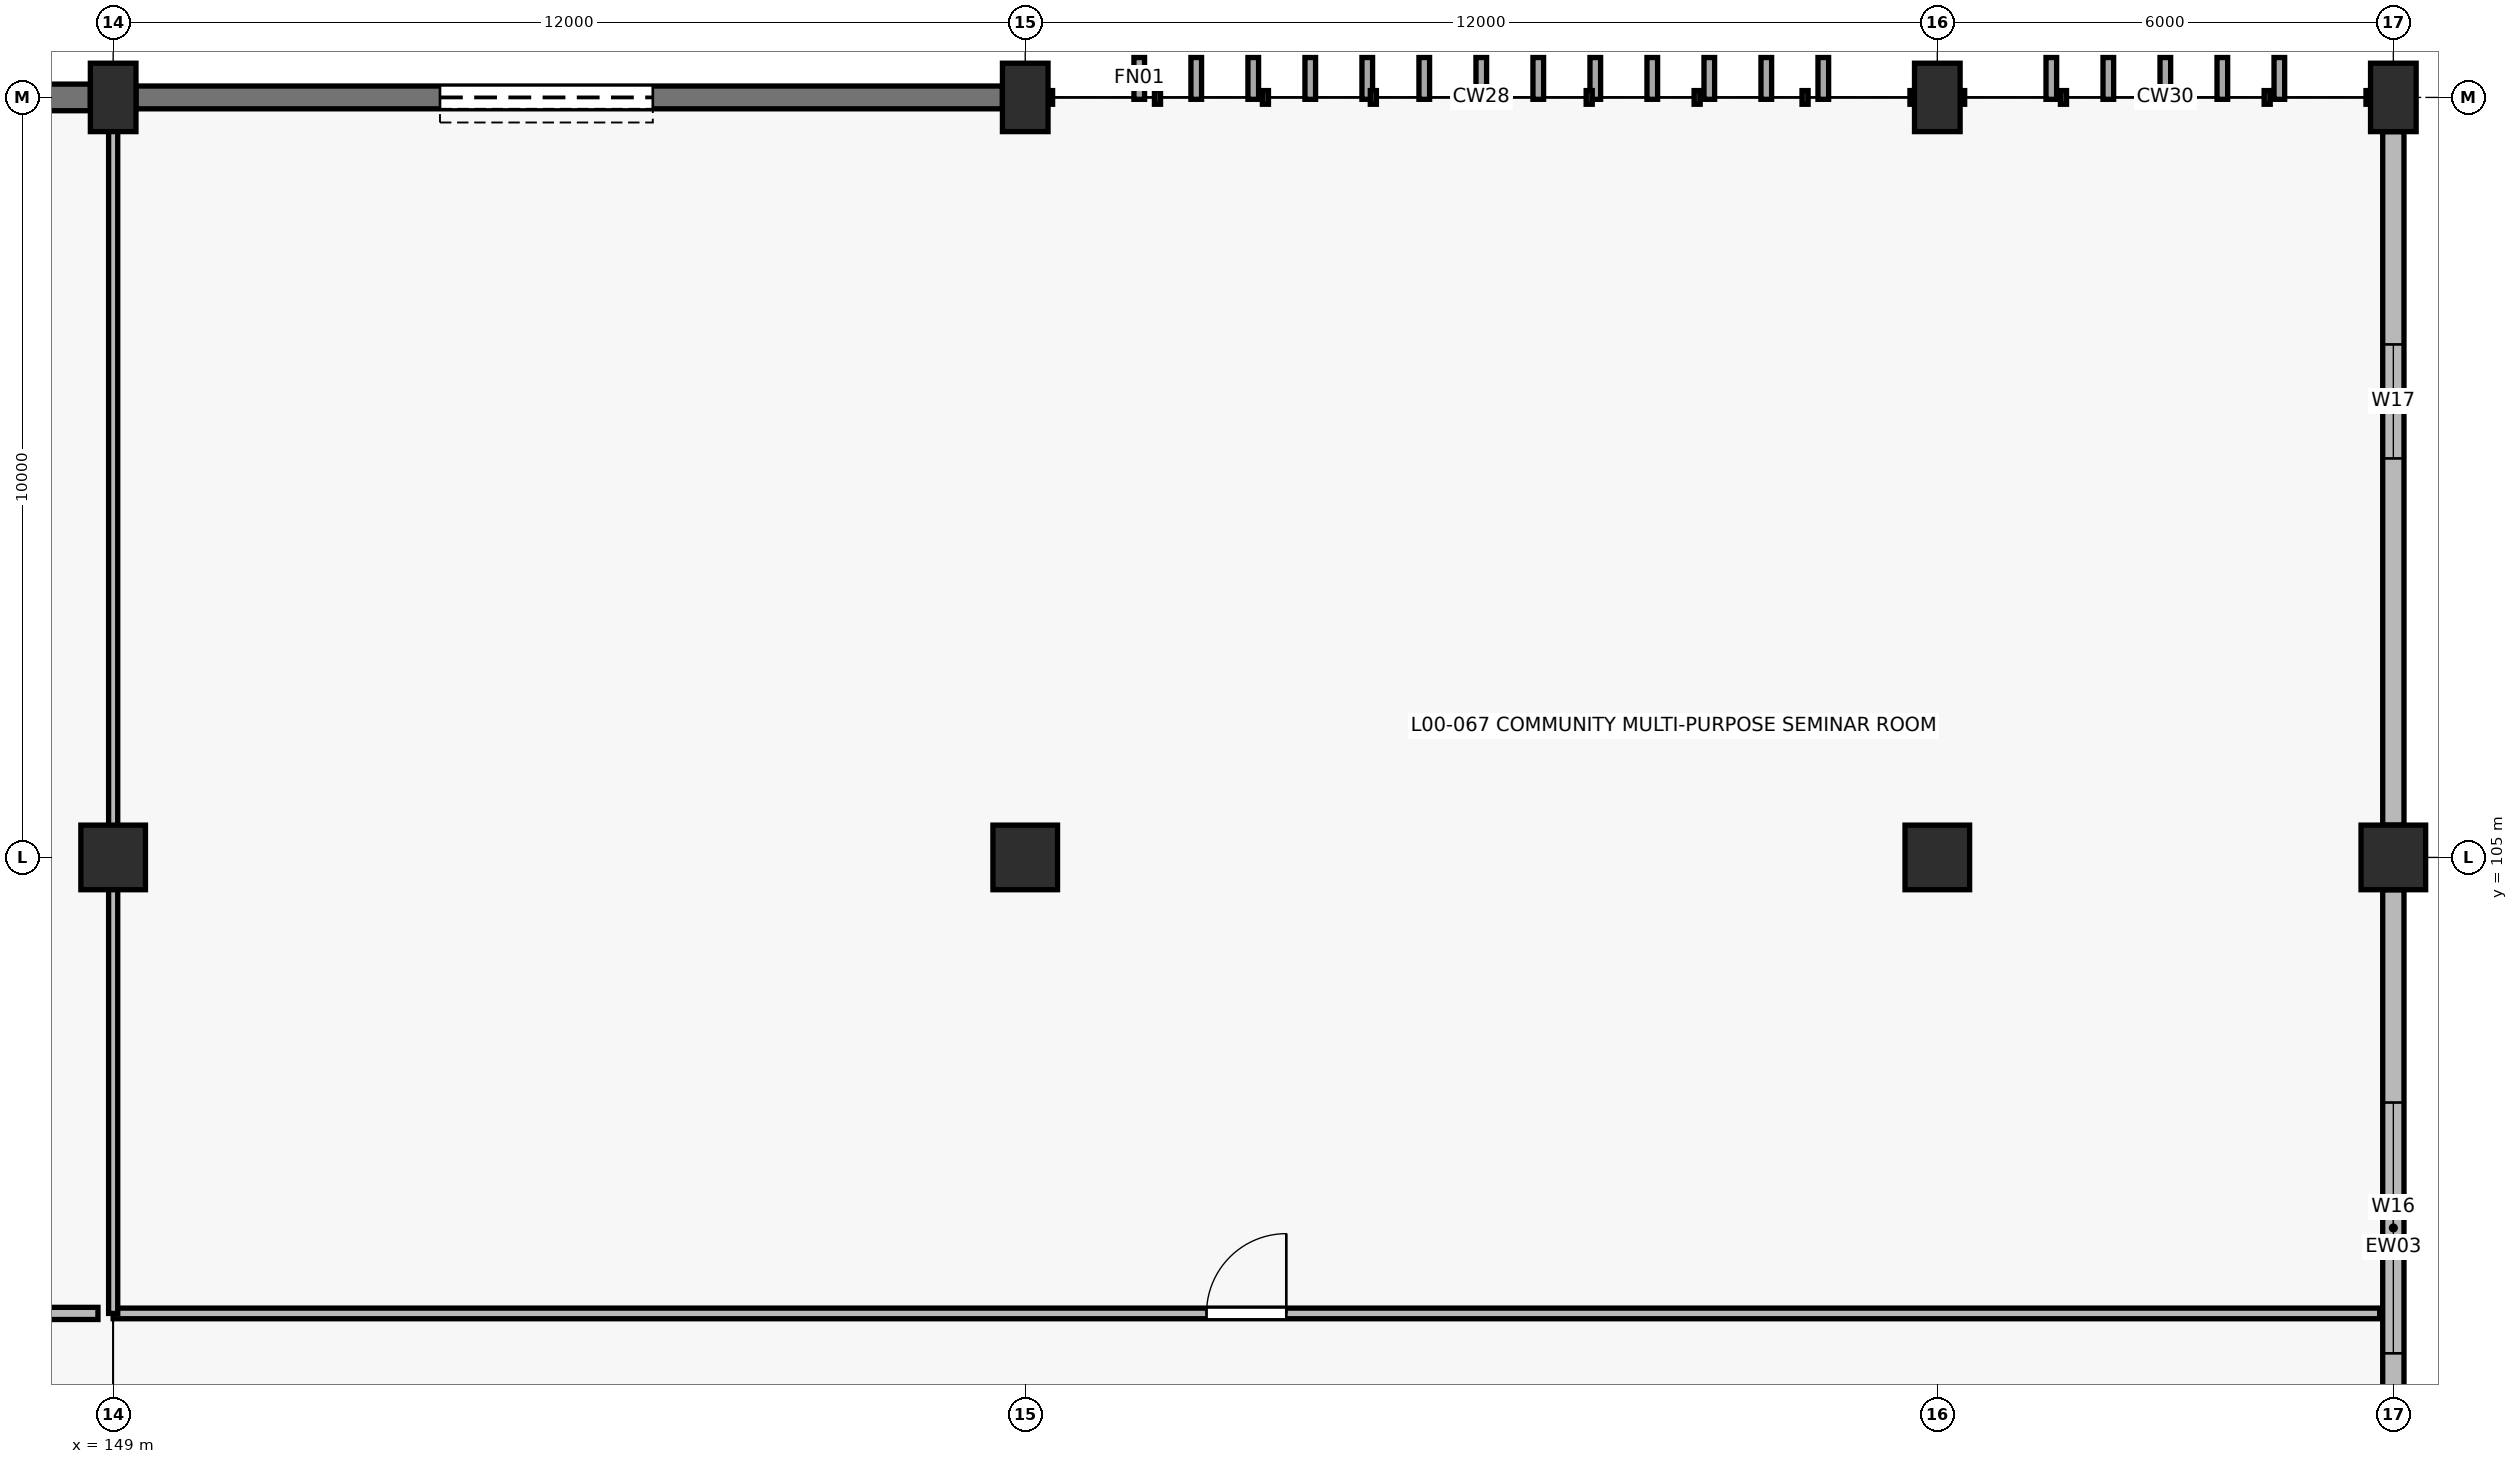
"""IFC4 building model, lengths in metres.
Left out: names, types, materials, properties, quantities, classifications, styles, units other than length and angle.
Written with IfcOpenShell. Run it as: python <this file> out.ifc"""

import sys

from ifc_helpers import new_model, si_unit, direction, frame, frame_2d, origin, origin_2d, place, context, subcontext, project, spatial, rectangle, extrude, element, fill, save


model = new_model("IFC4")
c1 = context("Model", 3, precision=1e-05, world=origin(), true_north=direction((0.0, 1.0)))
c2 = subcontext(c1, "Body", "Model", "MODEL_VIEW")
j1 = project(units=[si_unit("LENGTHUNIT", "METRE"), si_unit("PLANEANGLEUNIT", "RADIAN")], contexts=[c1])
p1 = place(None, origin())
s1 = spatial("IfcSite", under=j1, at=p1, CompositionType="ELEMENT")
p2 = place(p1, origin())
s2 = spatial("IfcBuilding", under=s1, at=p2, CompositionType="ELEMENT")
p3 = place(p2, origin())
s3 = spatial("IfcBuildingStorey", under=s2, at=p3, CompositionType="ELEMENT", Elevation=0.0)
p4 = place(p3, frame((149.0, 105.0, 0.0), z_axis=(0.0, 0.0, 1.0), x_axis=(1.0, 0.0, 0.0)))
e1 = element("IfcColumn", 1, at=p4, inside=s3, PredefinedType="COLUMN", context=c2, shape_type="SweptSolid", body=[
    extrude(rectangle(XDim=0.85, YDim=0.85, at=origin_2d()), origin(), (0.0, 0.0, 1.0), 4.8),
])
p5 = place(p3, frame((149.0, 115.0, 0.0), z_axis=(0.0, 0.0, 1.0), x_axis=(1.0, 0.0, 0.0)))
e2 = element("IfcColumn", 2, at=p5, inside=s3, PredefinedType="COLUMN", context=c2, shape_type="SweptSolid", body=[
    extrude(rectangle(XDim=0.6, YDim=0.9, at=origin_2d()), origin(), (0.0, 0.0, 1.0), 4.8),
])
p6 = place(p3, frame((161.0, 105.0, 0.0), z_axis=(0.0, 0.0, 1.0), x_axis=(1.0, 0.0, 0.0)))
e3 = element("IfcColumn", 3, at=p6, inside=s3, PredefinedType="COLUMN", context=c2, shape_type="SweptSolid", body=[
    extrude(rectangle(XDim=0.85, YDim=0.85, at=origin_2d()), origin(), (0.0, 0.0, 1.0), 4.8),
])
p7 = place(p3, frame((161.0, 115.0, 0.0), z_axis=(0.0, 0.0, 1.0), x_axis=(1.0, 0.0, 0.0)))
e4 = element("IfcColumn", 4, at=p7, inside=s3, PredefinedType="COLUMN", context=c2, shape_type="SweptSolid", body=[
    extrude(rectangle(XDim=0.6, YDim=0.9, at=origin_2d()), origin(), (0.0, 0.0, 1.0), 4.8),
])
p8 = place(p3, frame((173.0, 105.0, 0.0), z_axis=(0.0, 0.0, 1.0), x_axis=(1.0, 0.0, 0.0)))
e5 = element("IfcColumn", 5, at=p8, inside=s3, PredefinedType="COLUMN", context=c2, shape_type="SweptSolid", body=[
    extrude(rectangle(XDim=0.85, YDim=0.85, at=origin_2d()), origin(), (0.0, 0.0, 1.0), 4.8),
])
p9 = place(p3, frame((173.0, 115.0, 0.0), z_axis=(0.0, 0.0, 1.0), x_axis=(1.0, 0.0, 0.0)))
e6 = element("IfcColumn", 6, at=p9, inside=s3, PredefinedType="COLUMN", context=c2, shape_type="SweptSolid", body=[
    extrude(rectangle(XDim=0.6, YDim=0.9, at=origin_2d()), origin(), (0.0, 0.0, 1.0), 4.8),
])
p10 = place(p3, frame((179.0, 105.0, 0.0), z_axis=(0.0, 0.0, 1.0), x_axis=(1.0, 0.0, 0.0)))
e7 = element("IfcColumn", 7, at=p10, inside=s3, PredefinedType="COLUMN", context=c2, shape_type="SweptSolid", body=[
    extrude(rectangle(XDim=0.85, YDim=0.85, at=origin_2d()), origin(), (0.0, 0.0, 1.0), 4.8),
])
p11 = place(p3, frame((179.0, 115.0, 0.0), z_axis=(0.0, 0.0, 1.0), x_axis=(1.0, 0.0, 0.0)))
e8 = element("IfcColumn", 8, at=p11, inside=s3, PredefinedType="COLUMN", context=c2, shape_type="SweptSolid", body=[
    extrude(rectangle(XDim=0.6, YDim=0.9, at=origin_2d()), origin(), (0.0, 0.0, 1.0), 4.8),
])
p12 = place(p3, frame((137.3, 115.0, 0.0), z_axis=(0.0, 0.0, 1.0), x_axis=(1.0, 0.0, 0.0)))
e9 = element("IfcWall", 9, at=p12, inside=s3, PredefinedType="SOLIDWALL", context=c2, shape_type="SweptSolid", body=[
    extrude(rectangle(XDim=11.4, YDim=0.35, at=frame_2d((5.7, 0.0))), origin(), (0.0, 0.0, 1.0), 4.8),
])
p13 = place(p12, frame((2.0, 0.0, 0.0)))
e10 = element("IfcOpeningElement", 10, at=p13, cuts=e9, PredefinedType="OPENING", context=c2, shape_type="SweptSolid", body=[
    extrude(rectangle(XDim=2.0, YDim=2.3, at=frame_2d((1.0, 1.15))), frame((0.0, 0.185, 0.0), z_axis=(0.0, -1.0, 0.0), x_axis=(1.0, 0.0, 0.0)), (0.0, 0.0, 1.0), 0.37),
])
p14 = place(p3, frame((149.3, 115.0, 0.0), z_axis=(0.0, 0.0, 1.0), x_axis=(1.0, 0.0, 0.0)))
e11 = element("IfcWall", 11, at=p14, inside=s3, PredefinedType="SOLIDWALL", context=c2, shape_type="SweptSolid", body=[
    extrude(rectangle(XDim=11.4, YDim=0.3, at=frame_2d((5.7, 0.0))), origin(), (0.0, 0.0, 1.0), 4.8),
])
p15 = place(p14, frame((4.0, 0.0, 0.0)))
e12 = element("IfcOpeningElement", 12, at=p15, cuts=e11, PredefinedType="OPENING", context=c2, shape_type="SweptSolid", body=[
    extrude(rectangle(XDim=2.8, YDim=2.7, at=frame_2d((1.4, 1.35))), frame((0.0, 0.16, 0.0), z_axis=(0.0, -1.0, 0.0), x_axis=(1.0, 0.0, 0.0)), (0.0, 0.0, 1.0), 0.32),
])
p16 = place(p3, frame((179.0, 104.575, 0.0), z_axis=(0.0, 0.0, 1.0), x_axis=(0.0, -1.0, 0.0)))
e13 = element("IfcWall", 13, at=p16, inside=s3, PredefinedType="SOLIDWALL", context=c2, shape_type="SweptSolid", body=[
    extrude(rectangle(XDim=9.395, YDim=0.28, at=frame_2d((4.698, 0.0))), origin(), (0.0, 0.0, 1.0), 3.625),
])
p17 = place(p16, frame((2.8, 0.0, 0.9)))
e14 = element("IfcOpeningElement", 14, at=p17, cuts=e13, PredefinedType="OPENING", context=c2, shape_type="SweptSolid", body=[
    extrude(rectangle(XDim=3.3, YDim=1.8, at=frame_2d((1.65, 0.9))), frame((0.0, 0.15, 0.0), z_axis=(0.0, -1.0, 0.0), x_axis=(1.0, 0.0, 0.0)), (0.0, 0.0, 1.0), 0.3),
])
p18 = place(p3, frame((179.0, 114.55, 0.0), z_axis=(0.0, 0.0, 1.0), x_axis=(0.0, -1.0, 0.0)))
e15 = element("IfcWall", 15, at=p18, inside=s3, PredefinedType="SOLIDWALL", context=c2, shape_type="SweptSolid", body=[
    extrude(rectangle(XDim=9.125, YDim=0.28, at=frame_2d((4.562, 0.0))), origin(), (0.0, 0.0, 1.0), 3.775),
])
p19 = place(p18, frame((2.8, 0.0, 0.9)))
e16 = element("IfcOpeningElement", 16, at=p19, cuts=e15, PredefinedType="OPENING", context=c2, shape_type="SweptSolid", body=[
    extrude(rectangle(XDim=1.5, YDim=2.1, at=frame_2d((0.75, 1.05))), frame((0.0, 0.15, 0.0), z_axis=(0.0, -1.0, 0.0), x_axis=(1.0, 0.0, 0.0)), (0.0, 0.0, 1.0), 0.3),
])
p20 = place(p3, frame((137.4, 99.0, 0.0), z_axis=(0.0, 0.0, 1.0), x_axis=(1.0, 0.0, 0.0)))
e17 = element("IfcWall", 17, at=p20, inside=s3, PredefinedType="PARTITIONING", context=c2, shape_type="SweptSolid", body=[
    extrude(rectangle(XDim=11.4, YDim=0.16, at=frame_2d((5.7, 0.0))), origin(), (0.0, 0.0, 1.0), 3.625),
])
p21 = place(p20, frame((4.5, 0.0, 0.0)))
e18 = element("IfcOpeningElement", 18, at=p21, cuts=e17, PredefinedType="OPENING", context=c2, shape_type="SweptSolid", body=[
    extrude(rectangle(XDim=1.6, YDim=2.2, at=frame_2d((0.8, 1.1))), frame((0.0, 0.09, 0.0), z_axis=(0.0, -1.0, 0.0), x_axis=(1.0, 0.0, 0.0)), (0.0, 0.0, 1.0), 0.18),
])
p22 = place(p3, frame((149.0, 99.0, 0.0), z_axis=(0.0, 0.0, 1.0), x_axis=(1.0, 0.0, 0.0)))
e19 = element("IfcWall", 19, at=p22, inside=s3, PredefinedType="PARTITIONING", context=c2, shape_type="SweptSolid", body=[
    extrude(rectangle(XDim=29.82, YDim=0.14, at=frame_2d((14.91, 0.0))), origin(), (0.0, 0.0, 1.0), 3.625),
])
p23 = place(p22, frame((14.385, 0.0, 0.0)))
e20 = element("IfcOpeningElement", 20, at=p23, cuts=e19, PredefinedType="OPENING", context=c2, shape_type="SweptSolid", body=[
    extrude(rectangle(XDim=1.05, YDim=2.1, at=frame_2d((0.525, 1.05))), frame((0.0, 0.08, 0.0), z_axis=(0.0, -1.0, 0.0), x_axis=(1.0, 0.0, 0.0)), (0.0, 0.0, 1.0), 0.16),
])
p24 = place(p3, frame((149.0, 99.0, 0.0), z_axis=(0.0, 0.0, 1.0), x_axis=(0.0, 1.0, 0.0)))
e21 = element("IfcWall", 21, at=p24, inside=s3, PredefinedType="PARTITIONING", context=c2, shape_type="SweptSolid", body=[
    extrude(rectangle(XDim=15.75, YDim=0.12, at=frame_2d((7.875, 0.0))), origin(), (0.0, 0.0, 1.0), 3.625),
])
p25 = place(p15, origin())
e22 = element("IfcDoor", 22, at=p25, inside=s3, OperationType="DOUBLE_DOOR_SINGLE_SWING", PredefinedType="GATE", context=c2, shape_type="SweptSolid", body=[
    extrude(rectangle(XDim=2.8, YDim=2.7, at=frame_2d((1.4, 1.35))), frame((0.0, 0.025, 0.0), z_axis=(0.0, -1.0, 0.0), x_axis=(1.0, 0.0, 0.0)), (0.0, 0.0, 1.0), 0.05),
])
fill(e12, e22)
p26 = place(p17, origin())
e23 = element("IfcWindow", 23, at=p26, inside=s3, PartitioningType="DOUBLE_PANEL_VERTICAL", PredefinedType="WINDOW", context=c2, shape_type="SweptSolid", body=[
    extrude(rectangle(XDim=3.3, YDim=1.8, at=frame_2d((1.65, 0.9))), frame((0.0, 0.03, 0.0), z_axis=(0.0, -1.0, 0.0), x_axis=(1.0, 0.0, 0.0)), (0.0, 0.0, 1.0), 0.06),
])
fill(e14, e23)
p27 = place(p19, origin())
e24 = element("IfcWindow", 24, at=p27, inside=s3, PartitioningType="SINGLE_PANEL", PredefinedType="WINDOW", context=c2, shape_type="SweptSolid", body=[
    extrude(rectangle(XDim=1.5, YDim=2.1, at=frame_2d((0.75, 1.05))), frame((0.0, 0.03, 0.0), z_axis=(0.0, -1.0, 0.0), x_axis=(1.0, 0.0, 0.0)), (0.0, 0.0, 1.0), 0.06),
])
fill(e16, e24)
p28 = place(p23, origin())
e25 = element("IfcDoor", 25, at=p28, inside=s3, OperationType="SINGLE_SWING_RIGHT", PredefinedType="DOOR", context=c2, shape_type="SweptSolid", body=[
    extrude(rectangle(XDim=1.05, YDim=2.1, at=frame_2d((0.525, 1.05))), frame((0.0, 0.025, 0.0), z_axis=(0.0, -1.0, 0.0), x_axis=(1.0, 0.0, 0.0)), (0.0, 0.0, 1.0), 0.05),
])
fill(e20, e25)
save(model, sys.argv[1])
